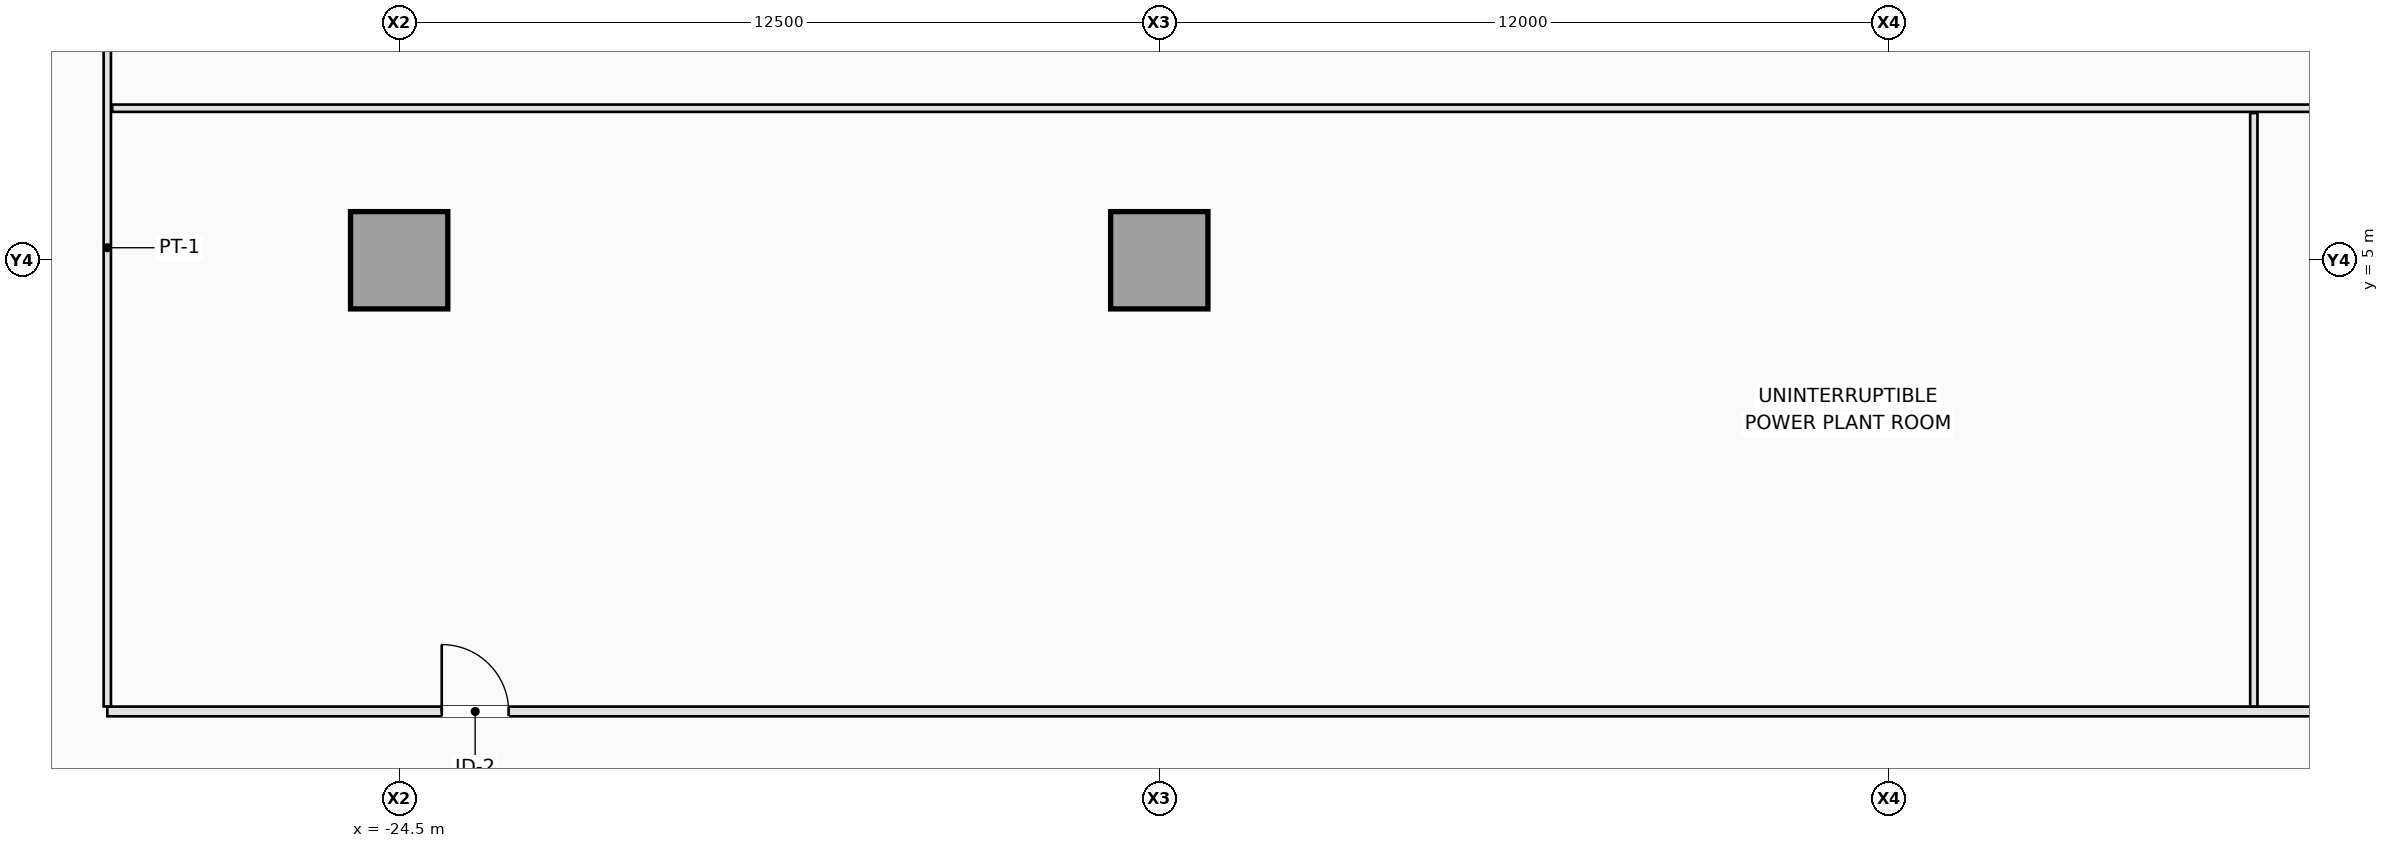
"""IFC4 building model, lengths in metres.
Left out: names, types, materials, properties, quantities, classifications, styles, units other than length and angle.
Written with IfcOpenShell. Run it as: python <this file> out.ifc"""

import sys

from ifc_helpers import new_model, si_unit, direction, frame, frame_2d, origin, origin_2d, place, context, subcontext, project, spatial, rectangle, extrude, element, fill, save


model = new_model("IFC4")
c1 = context("Model", 3, precision=1e-05, world=origin(), true_north=direction((0.0, 1.0)))
c2 = subcontext(c1, "Body", "Model", "MODEL_VIEW")
j1 = project(units=[si_unit("LENGTHUNIT", "METRE"), si_unit("PLANEANGLEUNIT", "RADIAN")], contexts=[c1])
p1 = place(None, origin())
s1 = spatial("IfcSite", under=j1, at=p1, CompositionType="ELEMENT")
p2 = place(p1, origin())
s2 = spatial("IfcBuilding", under=s1, at=p2, CompositionType="ELEMENT")
p3 = place(p2, frame((0.0, 0.0, -5.0)))
s3 = spatial("IfcBuildingStorey", under=s2, at=p3, CompositionType="ELEMENT", Elevation=-5.0)
for number, where, z_axis, x_axis in (
    (1, (-24.5, 5.0, 0.0), (0.0, 0.0, 1.0), (1.0, 0.0, 0.0)),
    (2, (-12.0, 5.0, 0.0), (0.0, 0.0, 1.0), (1.0, 0.0, 0.0)),
):
    element("IfcColumn", number, at=place(p3, frame(where, z_axis=z_axis, x_axis=x_axis)), inside=s3, PredefinedType="COLUMN", context=c2, shape_type="SweptSolid", body=[
        extrude(rectangle(XDim=1.6, YDim=1.6, at=origin_2d()), origin(), (0.0, 0.0, 1.0), 5.0),
    ])
p4 = place(p3, frame((-29.3, -2.42, 0.0), z_axis=(0.0, 0.0, 1.0), x_axis=(1.0, 0.0, 0.0)))
e3 = element("IfcWall", 3, at=p4, inside=s3, PredefinedType="PARTITIONING", context=c2, shape_type="SweptSolid", body=[
    extrude(rectangle(XDim=58.6, YDim=0.16, at=frame_2d((29.3, 0.0))), origin(), (0.0, 0.0, 1.0), 4.7),
])
p5 = place(p4, frame((5.5, 0.0, 0.0)))
e4 = element("IfcOpeningElement", 4, at=p5, cuts=e3, PredefinedType="OPENING", context=c2, shape_type="SweptSolid", body=[
    extrude(rectangle(XDim=1.1, YDim=2.15, at=frame_2d((0.55, 1.075))), frame((0.0, 0.09, 0.0), z_axis=(0.0, -1.0, 0.0), x_axis=(1.0, 0.0, 0.0)), (0.0, 0.0, 1.0), 0.18),
])
p6 = place(p4, frame((50.0, 0.0, 0.0)))
e5 = element("IfcOpeningElement", 5, at=p6, cuts=e3, PredefinedType="OPENING", context=c2, shape_type="SweptSolid", body=[
    extrude(rectangle(XDim=1.1, YDim=2.15, at=frame_2d((0.55, 1.075))), frame((0.0, 0.09, 0.0), z_axis=(0.0, -1.0, 0.0), x_axis=(1.0, 0.0, 0.0)), (0.0, 0.0, 1.0), 0.18),
])
p7 = place(p3, frame((-29.3, -2.338, 0.0), z_axis=(0.0, 0.0, 1.0), x_axis=(0.0, 1.0, 0.0)))
e6 = element("IfcWall", 6, at=p7, inside=s3, PredefinedType="PARTITIONING", context=c2, shape_type="SweptSolid", body=[
    extrude(rectangle(XDim=15.088, YDim=0.12, at=frame_2d((7.544, 0.0))), origin(), (0.0, 0.0, 1.0), 4.7),
])
p8 = place(p7, frame((11.038, 0.0, 0.0)))
e7 = element("IfcOpeningElement", 7, at=p8, cuts=e6, PredefinedType="OPENING", context=c2, shape_type="SweptSolid", body=[
    extrude(rectangle(XDim=1.1, YDim=2.15, at=frame_2d((0.55, 1.075))), frame((0.0, 0.07, 0.0), z_axis=(0.0, -1.0, 0.0), x_axis=(1.0, 0.0, 0.0)), (0.0, 0.0, 1.0), 0.14),
])
p9 = place(p3, frame((6.0, -2.338, 0.0), z_axis=(0.0, 0.0, 1.0), x_axis=(0.0, 1.0, 0.0)))
e8 = element("IfcWall", 8, at=p9, inside=s3, PredefinedType="PARTITIONING", context=c2, shape_type="SweptSolid", body=[
    extrude(rectangle(XDim=9.758, YDim=0.12, at=frame_2d((4.879, 0.0))), origin(), (0.0, 0.0, 1.0), 4.7),
])
p10 = place(p3, frame((-29.22, 7.5, 0.0), z_axis=(0.0, 0.0, 1.0), x_axis=(1.0, 0.0, 0.0)))
e9 = element("IfcWall", 9, at=p10, inside=s3, PredefinedType="PARTITIONING", context=c2, shape_type="SweptSolid", body=[
    extrude(rectangle(XDim=58.44, YDim=0.12, at=frame_2d((29.22, 0.0))), origin(), (0.0, 0.0, 1.0), 4.7),
])
p11 = place(p5, origin())
e10 = element("IfcDoor", 10, at=p11, inside=s3, OperationType="SINGLE_SWING_LEFT", PredefinedType="DOOR", context=c2, shape_type="SweptSolid", body=[
    extrude(rectangle(XDim=1.1, YDim=2.15, at=frame_2d((0.55, 1.075))), frame((0.0, 0.025, 0.0), z_axis=(0.0, -1.0, 0.0), x_axis=(1.0, 0.0, 0.0)), (0.0, 0.0, 1.0), 0.05),
])
fill(e4, e10)
save(model, sys.argv[1])
